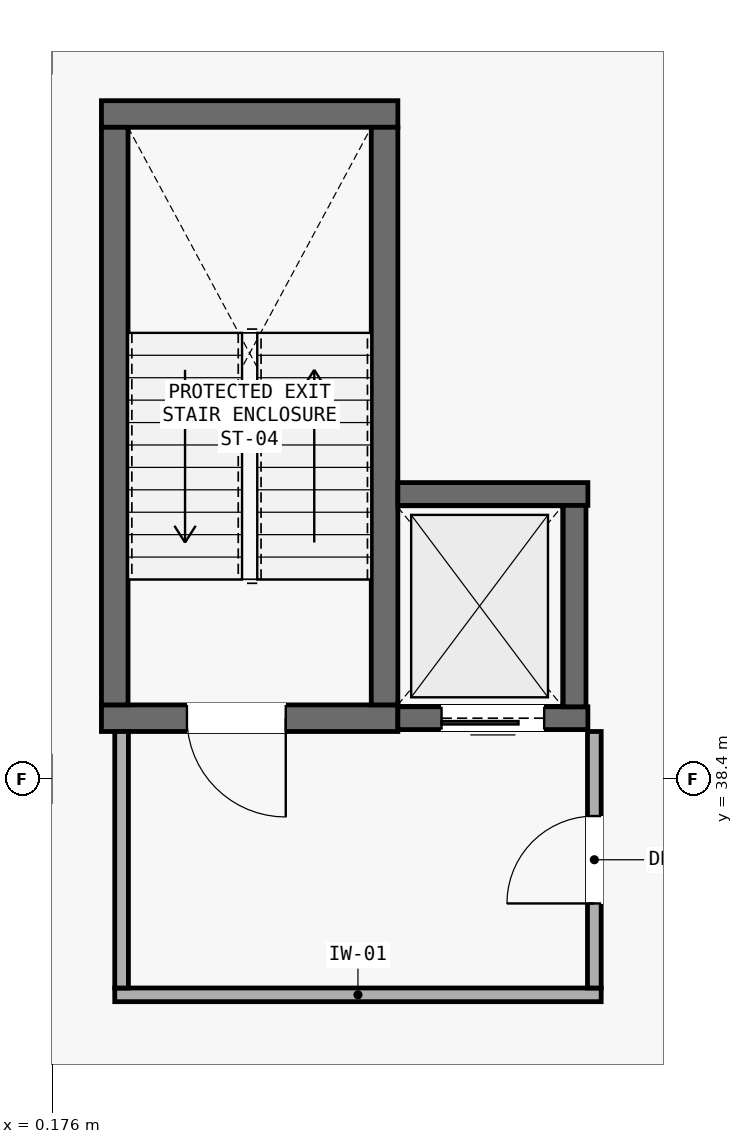
"""IFC4 building model, lengths in metres.
Left out: names, types, materials, properties, quantities, classifications, styles, units other than length and angle.
Written with IfcOpenShell. Run it as: python <this file> out.ifc"""

import sys

from ifc_helpers import new_model, si_unit, direction, frame, frame_2d, origin, place, context, subcontext, project, spatial, rectangle, extrude, element, fill, save


model = new_model("IFC4")
c1 = context("Model", 3, precision=1e-05, world=origin(), true_north=direction((0.0, 1.0)))
c2 = subcontext(c1, "Body", "Model", "MODEL_VIEW")
j1 = project(units=[si_unit("LENGTHUNIT", "METRE"), si_unit("PLANEANGLEUNIT", "RADIAN")], contexts=[c1])
p1 = place(None, origin())
s1 = spatial("IfcSite", under=j1, at=p1, CompositionType="ELEMENT")
p2 = place(p1, origin())
s2 = spatial("IfcBuilding", under=s1, at=p2, CompositionType="ELEMENT")
p3 = place(p2, frame((0.0, 0.0, 5.25)))
s3 = spatial("IfcBuildingStorey", under=s2, at=p3, CompositionType="ELEMENT", Elevation=5.25)
p4 = place(p3, frame((0.825, 39.2, 0.0), z_axis=(0.0, 0.0, 1.0), x_axis=(1.0, 0.0, 0.0)))
e1 = element("IfcWall", 1, at=p4, inside=s3, PredefinedType="SHEAR", context=c2, shape_type="SweptSolid", body=[
    extrude(rectangle(XDim=3.9, YDim=0.35, at=frame_2d((1.95, 0.0))), origin(), (0.0, 0.0, 1.0), 3.96),
])
p5 = place(p4, frame((1.125, 0.0, 0.0)))
e2 = element("IfcOpeningElement", 2, at=p5, cuts=e1, PredefinedType="OPENING", context=c2, shape_type="SweptSolid", body=[
    extrude(rectangle(XDim=1.3, YDim=2.15, at=frame_2d((0.65, 1.075))), frame((0.0, 0.185, 0.0), z_axis=(0.0, -1.0, 0.0), x_axis=(1.0, 0.0, 0.0)), (0.0, 0.0, 1.0), 0.37),
])
p6 = place(p3, frame((0.825, 47.15, 0.0), z_axis=(0.0, 0.0, 1.0), x_axis=(1.0, 0.0, 0.0)))
e3 = element("IfcWall", 3, at=p6, inside=s3, PredefinedType="SHEAR", context=c2, shape_type="SweptSolid", body=[
    extrude(rectangle(XDim=3.9, YDim=0.35, at=frame_2d((1.95, 0.0))), origin(), (0.0, 0.0, 1.0), 3.96),
])
for number, where, z_axis, x_axis in (
    (4, (1.0, 39.375, 0.0), (0.0, 0.0, 1.0), (0.0, 1.0, 0.0)),
    (5, (4.55, 39.375, 0.0), (0.0, 0.0, 1.0), (0.0, 1.0, 0.0)),
):
    element("IfcWall", number, at=place(p3, frame(where, z_axis=z_axis, x_axis=x_axis)), inside=s3, PredefinedType="SHEAR", context=c2, shape_type="SweptSolid", body=[
        extrude(rectangle(XDim=7.6, YDim=0.35, at=frame_2d((3.8, 0.0))), origin(), (0.0, 0.0, 1.0), 3.96),
    ])
p7 = place(p3, frame((4.725, 39.2, 0.0), z_axis=(0.0, 0.0, 1.0), x_axis=(1.0, 0.0, 0.0)))
e6 = element("IfcWall", 6, at=p7, inside=s3, PredefinedType="SHEAR", context=c2, shape_type="SweptSolid", body=[
    extrude(rectangle(XDim=2.5, YDim=0.3, at=frame_2d((1.25, 0.0))), origin(), (0.0, 0.0, 1.0), 3.96),
])
p8 = place(p7, frame((0.575, 0.0, 0.0)))
e7 = element("IfcOpeningElement", 7, at=p8, cuts=e6, PredefinedType="OPENING", context=c2, shape_type="SweptSolid", body=[
    extrude(rectangle(XDim=1.35, YDim=2.15, at=frame_2d((0.675, 1.075))), frame((0.0, 0.16, 0.0), z_axis=(0.0, -1.0, 0.0), x_axis=(1.0, 0.0, 0.0)), (0.0, 0.0, 1.0), 0.32),
])
p9 = place(p3, frame((4.725, 42.15, 0.0), z_axis=(0.0, 0.0, 1.0), x_axis=(1.0, 0.0, 0.0)))
e8 = element("IfcWall", 8, at=p9, inside=s3, PredefinedType="SHEAR", context=c2, shape_type="SweptSolid", body=[
    extrude(rectangle(XDim=2.5, YDim=0.3, at=frame_2d((1.25, 0.0))), origin(), (0.0, 0.0, 1.0), 3.96),
])
p10 = place(p3, frame((7.05, 39.35, 0.0), z_axis=(0.0, 0.0, 1.0), x_axis=(0.0, 1.0, 0.0)))
e9 = element("IfcWall", 9, at=p10, inside=s3, PredefinedType="SHEAR", context=c2, shape_type="SweptSolid", body=[
    extrude(rectangle(XDim=2.65, YDim=0.3, at=frame_2d((1.325, 0.0))), origin(), (0.0, 0.0, 1.0), 3.96),
])
p11 = place(p3, frame((1.0, 35.56, 0.0), z_axis=(0.0, 0.0, 1.0), x_axis=(1.0, 0.0, 0.0)))
e10 = element("IfcWall", 10, at=p11, inside=s3, PredefinedType="PARTITIONING", context=c2, shape_type="SweptSolid", body=[
    extrude(rectangle(XDim=6.4, YDim=0.18, at=frame_2d((3.2, 0.0))), origin(), (0.0, 0.0, 1.0), 3.96),
])
p12 = place(p3, frame((1.09, 35.65, 0.0), z_axis=(0.0, 0.0, 1.0), x_axis=(0.0, 1.0, 0.0)))
e11 = element("IfcWall", 11, at=p12, inside=s3, PredefinedType="PARTITIONING", context=c2, shape_type="SweptSolid", body=[
    extrude(rectangle(XDim=3.375, YDim=0.18, at=frame_2d((1.688, 0.0))), origin(), (0.0, 0.0, 1.0), 3.96),
])
p13 = place(p3, frame((7.31, 35.65, 0.0), z_axis=(0.0, 0.0, 1.0), x_axis=(0.0, 1.0, 0.0)))
e12 = element("IfcWall", 12, at=p13, inside=s3, PredefinedType="PARTITIONING", context=c2, shape_type="SweptSolid", body=[
    extrude(rectangle(XDim=3.375, YDim=0.18, at=frame_2d((1.688, 0.0))), origin(), (0.0, 0.0, 1.0), 3.96),
])
p14 = place(p13, frame((1.113, 0.0, 0.0)))
e13 = element("IfcOpeningElement", 13, at=p14, cuts=e12, PredefinedType="OPENING", context=c2, shape_type="SweptSolid", body=[
    extrude(rectangle(XDim=1.15, YDim=2.15, at=frame_2d((0.575, 1.075))), frame((0.0, 0.1, 0.0), z_axis=(0.0, -1.0, 0.0), x_axis=(1.0, 0.0, 0.0)), (0.0, 0.0, 1.0), 0.2),
])
p15 = place(p5, frame((1.3, 0.0, 0.0), z_axis=(0.0, 0.0, 1.0), x_axis=(-1.0, 0.0, 0.0)))
e14 = element("IfcDoor", 14, at=p15, inside=s3, OperationType="SINGLE_SWING_RIGHT", PredefinedType="DOOR", context=c2, shape_type="SweptSolid", body=[
    extrude(rectangle(XDim=1.3, YDim=2.15, at=frame_2d((0.65, 1.075))), frame((0.0, 0.025, 0.0), z_axis=(0.0, -1.0, 0.0), x_axis=(1.0, 0.0, 0.0)), (0.0, 0.0, 1.0), 0.05),
])
fill(e2, e14)
p16 = place(p8, frame((1.35, 0.0, 0.0), z_axis=(0.0, 0.0, 1.0), x_axis=(-1.0, 0.0, 0.0)))
e15 = element("IfcDoor", 15, at=p16, inside=s3, OperationType="SLIDING_TO_RIGHT", PredefinedType="DOOR", context=c2, shape_type="SweptSolid", body=[
    extrude(rectangle(XDim=1.35, YDim=2.15, at=frame_2d((0.675, 1.075))), frame((0.0, 0.025, 0.0), z_axis=(0.0, -1.0, 0.0), x_axis=(1.0, 0.0, 0.0)), (0.0, 0.0, 1.0), 0.05),
])
fill(e7, e15)
p17 = place(p14, origin())
e16 = element("IfcDoor", 16, at=p17, inside=s3, OperationType="SINGLE_SWING_LEFT", PredefinedType="DOOR", context=c2, shape_type="SweptSolid", body=[
    extrude(rectangle(XDim=1.15, YDim=2.15, at=frame_2d((0.575, 1.075))), frame((0.0, 0.025, 0.0), z_axis=(0.0, -1.0, 0.0), x_axis=(1.0, 0.0, 0.0)), (0.0, 0.0, 1.0), 0.05),
])
fill(e13, e16)
save(model, sys.argv[1])
